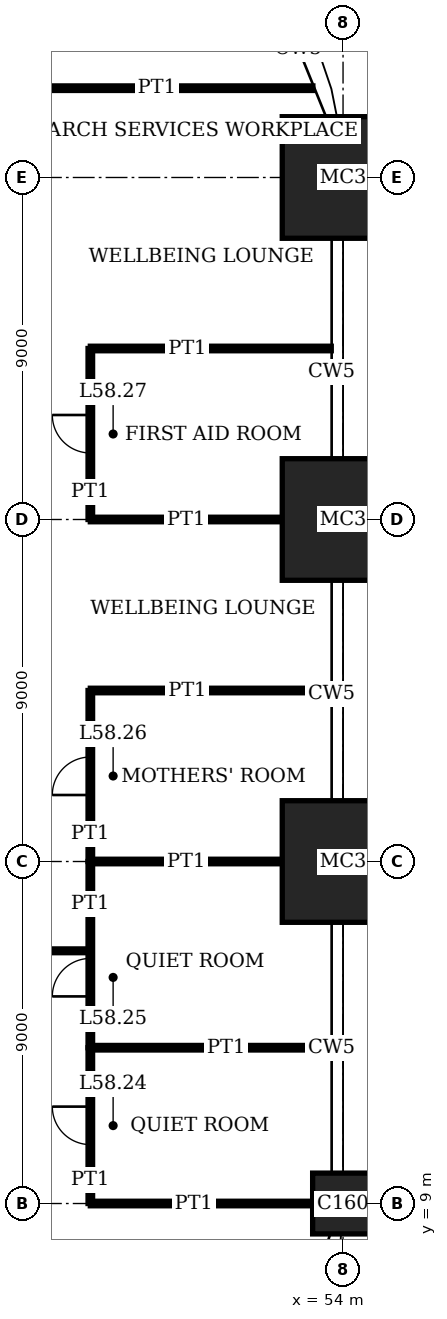
"""IFC4 building model, lengths in metres.
Left out: names, types, materials, properties, quantities, classifications, styles, units other than length and angle.
Written with IfcOpenShell. Run it as: python <this file> out.ifc"""

import sys

from ifc_helpers import new_model, si_unit, direction, frame, frame_2d, origin, origin_2d, place, context, subcontext, project, spatial, rectangle, extrude, element, fill, save


model = new_model("IFC4")
c1 = context("Model", 3, precision=1e-05, world=origin(), true_north=direction((0.0, 1.0)))
c2 = subcontext(c1, "Body", "Model", "MODEL_VIEW")
j1 = project(units=[si_unit("LENGTHUNIT", "METRE"), si_unit("PLANEANGLEUNIT", "RADIAN")], contexts=[c1])
p1 = place(None, origin())
s1 = spatial("IfcSite", under=j1, at=p1, CompositionType="ELEMENT")
p2 = place(p1, origin())
s2 = spatial("IfcBuilding", under=s1, at=p2, CompositionType="ELEMENT")
p3 = place(p2, frame((0.0, 0.0, 239.4)))
s3 = spatial("IfcBuildingStorey", under=s2, at=p3, CompositionType="ELEMENT", Elevation=239.4)
p4 = place(p3, frame((54.0, 9.0, 0.0), z_axis=(0.0, 0.0, 1.0), x_axis=(1.0, 0.0, 0.0)))
e1 = element("IfcColumn", 1, at=p4, inside=s3, PredefinedType="COLUMN", context=c2, shape_type="SweptSolid", body=[
    extrude(rectangle(XDim=1.6, YDim=1.6, at=origin_2d()), origin(), (0.0, 0.0, 1.0), 4.0),
])
for number, where, z_axis, x_axis in (
    (2, (54.0, 18.0, 0.0), (0.0, 0.0, 1.0), (1.0, 0.0, 0.0)),
    (3, (54.0, 27.0, 0.0), (0.0, 0.0, 1.0), (1.0, 0.0, 0.0)),
    (4, (54.0, 36.0, 0.0), (0.0, 0.0, 1.0), (1.0, 0.0, 0.0)),
):
    element("IfcColumn", number, at=place(p3, frame(where, z_axis=z_axis, x_axis=x_axis)), inside=s3, PredefinedType="COLUMN", context=c2, shape_type="SweptSolid", body=[
        extrude(rectangle(XDim=3.2, YDim=3.2, at=origin_2d()), origin(), (0.0, 0.0, 1.0), 4.0),
    ])
p5 = place(p3, frame((47.35, 9.0, 0.0), z_axis=(0.0, 0.0, 1.0), x_axis=(1.0, 0.0, 0.0)))
e5 = element("IfcWall", 5, at=p5, inside=s3, PredefinedType="PARTITIONING", context=c2, shape_type="SweptSolid", body=[
    extrude(rectangle(XDim=5.85, YDim=0.12, at=frame_2d((2.925, 0.0))), origin(), (0.0, 0.0, 1.0), 3.05),
])
p6 = place(p3, frame((47.35, 13.1, 0.0), z_axis=(0.0, 0.0, 1.0), x_axis=(1.0, 0.0, 0.0)))
e6 = element("IfcWall", 6, at=p6, inside=s3, PredefinedType="PARTITIONING", context=c2, shape_type="SweptSolid", body=[
    extrude(rectangle(XDim=6.34, YDim=0.12, at=frame_2d((3.17, 0.0))), origin(), (0.0, 0.0, 1.0), 3.75),
])
p7 = place(p3, frame((31.5, 15.65, 0.0), z_axis=(0.0, 0.0, 1.0), x_axis=(1.0, 0.0, 0.0)))
e7 = element("IfcWall", 7, at=p7, inside=s3, PredefinedType="PARTITIONING", context=c2, shape_type="SweptSolid", body=[
    extrude(rectangle(XDim=15.84, YDim=0.1, at=frame_2d((7.92, 0.0))), origin(), (0.0, 0.0, 1.0), 3.75),
])
p8 = place(p7, frame((7.42, 0.0, 0.0)))
e8 = element("IfcOpeningElement", 8, at=p8, cuts=e7, PredefinedType="OPENING", context=c2, shape_type="SweptSolid", body=[
    extrude(rectangle(XDim=1.0, YDim=2.4, at=frame_2d((0.5, 1.2))), frame((0.0, 0.06, 0.0), z_axis=(0.0, -1.0, 0.0), x_axis=(1.0, 0.0, 0.0)), (0.0, 0.0, 1.0), 0.12),
])
p9 = place(p3, frame((47.35, 18.0, 0.0), z_axis=(0.0, 0.0, 1.0), x_axis=(1.0, 0.0, 0.0)))
e9 = element("IfcWall", 9, at=p9, inside=s3, PredefinedType="PARTITIONING", context=c2, shape_type="SweptSolid", body=[
    extrude(rectangle(XDim=5.05, YDim=0.12, at=frame_2d((2.525, 0.0))), origin(), (0.0, 0.0, 1.0), 3.05),
])
p10 = place(p3, frame((47.35, 22.5, 0.0), z_axis=(0.0, 0.0, 1.0), x_axis=(1.0, 0.0, 0.0)))
e10 = element("IfcWall", 10, at=p10, inside=s3, PredefinedType="PARTITIONING", context=c2, shape_type="SweptSolid", body=[
    extrude(rectangle(XDim=6.34, YDim=0.12, at=frame_2d((3.17, 0.0))), origin(), (0.0, 0.0, 1.0), 3.1),
])
p11 = place(p3, frame((47.35, 27.0, 0.0), z_axis=(0.0, 0.0, 1.0), x_axis=(1.0, 0.0, 0.0)))
e11 = element("IfcWall", 11, at=p11, inside=s3, PredefinedType="PARTITIONING", context=c2, shape_type="SweptSolid", body=[
    extrude(rectangle(XDim=5.05, YDim=0.12, at=frame_2d((2.525, 0.0))), origin(), (0.0, 0.0, 1.0), 3.05),
])
p12 = place(p3, frame((47.35, 31.5, 0.0), z_axis=(0.0, 0.0, 1.0), x_axis=(1.0, 0.0, 0.0)))
e12 = element("IfcWall", 12, at=p12, inside=s3, PredefinedType="PARTITIONING", context=c2, shape_type="SweptSolid", body=[
    extrude(rectangle(XDim=6.34, YDim=0.12, at=frame_2d((3.17, 0.0))), origin(), (0.0, 0.0, 1.0), 3.1),
])
p13 = place(p3, frame((45.0, 38.35, 0.0), z_axis=(0.0, 0.0, 1.0), x_axis=(1.0, 0.0, 0.0)))
e13 = element("IfcWall", 13, at=p13, inside=s3, PredefinedType="PARTITIONING", context=c2, shape_type="SweptSolid", body=[
    extrude(rectangle(XDim=8.206, YDim=0.12, at=frame_2d((4.103, 0.0))), origin(), (0.0, 0.0, 1.0), 3.75),
])
p14 = place(p3, frame((47.35, 9.0, 0.0), z_axis=(0.0, 0.0, 1.0), x_axis=(0.0, 1.0, 0.0)))
e14 = element("IfcWall", 14, at=p14, inside=s3, PredefinedType="PARTITIONING", context=c2, shape_type="SweptSolid", body=[
    extrude(rectangle(XDim=4.1, YDim=0.12, at=frame_2d((2.05, 0.0))), origin(), (0.0, 0.0, 1.0), 3.75),
])
p15 = place(p14, frame((1.55, 0.0, 0.0)))
e15 = element("IfcOpeningElement", 15, at=p15, cuts=e14, PredefinedType="OPENING", context=c2, shape_type="SweptSolid", body=[
    extrude(rectangle(XDim=1.0, YDim=2.4, at=frame_2d((0.5, 1.2))), frame((0.0, 0.07, 0.0), z_axis=(0.0, -1.0, 0.0), x_axis=(1.0, 0.0, 0.0)), (0.0, 0.0, 1.0), 0.14),
])
p16 = place(p3, frame((47.35, 13.1, 0.0), z_axis=(0.0, 0.0, 1.0), x_axis=(0.0, 1.0, 0.0)))
e16 = element("IfcWall", 16, at=p16, inside=s3, PredefinedType="PARTITIONING", context=c2, shape_type="SweptSolid", body=[
    extrude(rectangle(XDim=4.9, YDim=0.12, at=frame_2d((2.45, 0.0))), origin(), (0.0, 0.0, 1.0), 3.75),
])
p17 = place(p16, frame((1.35, 0.0, 0.0)))
e17 = element("IfcOpeningElement", 17, at=p17, cuts=e16, PredefinedType="OPENING", context=c2, shape_type="SweptSolid", body=[
    extrude(rectangle(XDim=1.0, YDim=2.4, at=frame_2d((0.5, 1.2))), frame((0.0, 0.07, 0.0), z_axis=(0.0, -1.0, 0.0), x_axis=(1.0, 0.0, 0.0)), (0.0, 0.0, 1.0), 0.14),
])
p18 = place(p3, frame((47.35, 18.0, 0.0), z_axis=(0.0, 0.0, 1.0), x_axis=(0.0, 1.0, 0.0)))
e18 = element("IfcWall", 18, at=p18, inside=s3, PredefinedType="PARTITIONING", context=c2, shape_type="SweptSolid", body=[
    extrude(rectangle(XDim=4.5, YDim=0.12, at=frame_2d((2.25, 0.0))), origin(), (0.0, 0.0, 1.0), 3.75),
])
p19 = place(p18, frame((1.75, 0.0, 0.0)))
e19 = element("IfcOpeningElement", 19, at=p19, cuts=e18, PredefinedType="OPENING", context=c2, shape_type="SweptSolid", body=[
    extrude(rectangle(XDim=1.0, YDim=2.4, at=frame_2d((0.5, 1.2))), frame((0.0, 0.07, 0.0), z_axis=(0.0, -1.0, 0.0), x_axis=(1.0, 0.0, 0.0)), (0.0, 0.0, 1.0), 0.14),
])
p20 = place(p3, frame((47.35, 27.0, 0.0), z_axis=(0.0, 0.0, 1.0), x_axis=(0.0, 1.0, 0.0)))
e20 = element("IfcWall", 20, at=p20, inside=s3, PredefinedType="PARTITIONING", context=c2, shape_type="SweptSolid", body=[
    extrude(rectangle(XDim=4.5, YDim=0.12, at=frame_2d((2.25, 0.0))), origin(), (0.0, 0.0, 1.0), 3.75),
])
p21 = place(p20, frame((1.75, 0.0, 0.0)))
e21 = element("IfcOpeningElement", 21, at=p21, cuts=e20, PredefinedType="OPENING", context=c2, shape_type="SweptSolid", body=[
    extrude(rectangle(XDim=1.0, YDim=2.4, at=frame_2d((0.5, 1.2))), frame((0.0, 0.07, 0.0), z_axis=(0.0, -1.0, 0.0), x_axis=(1.0, 0.0, 0.0)), (0.0, 0.0, 1.0), 0.14),
])
p22 = place(p15, origin())
e22 = element("IfcDoor", 22, at=p22, inside=s3, OperationType="SINGLE_SWING_LEFT", PredefinedType="DOOR", context=c2, shape_type="SweptSolid", body=[
    extrude(rectangle(XDim=1.0, YDim=2.4, at=frame_2d((0.5, 1.2))), frame((0.0, 0.025, 0.0), z_axis=(0.0, -1.0, 0.0), x_axis=(1.0, 0.0, 0.0)), (0.0, 0.0, 1.0), 0.05),
])
fill(e15, e22)
p23 = place(p17, origin())
e23 = element("IfcDoor", 23, at=p23, inside=s3, OperationType="SINGLE_SWING_RIGHT", PredefinedType="DOOR", context=c2, shape_type="SweptSolid", body=[
    extrude(rectangle(XDim=1.0, YDim=2.4, at=frame_2d((0.5, 1.2))), frame((0.0, 0.025, 0.0), z_axis=(0.0, -1.0, 0.0), x_axis=(1.0, 0.0, 0.0)), (0.0, 0.0, 1.0), 0.05),
])
fill(e17, e23)
p24 = place(p19, origin())
e24 = element("IfcDoor", 24, at=p24, inside=s3, OperationType="SINGLE_SWING_RIGHT", PredefinedType="DOOR", context=c2, shape_type="SweptSolid", body=[
    extrude(rectangle(XDim=1.0, YDim=2.4, at=frame_2d((0.5, 1.2))), frame((0.0, 0.025, 0.0), z_axis=(0.0, -1.0, 0.0), x_axis=(1.0, 0.0, 0.0)), (0.0, 0.0, 1.0), 0.05),
])
fill(e19, e24)
p25 = place(p21, origin())
e25 = element("IfcDoor", 25, at=p25, inside=s3, OperationType="SINGLE_SWING_LEFT", PredefinedType="DOOR", context=c2, shape_type="SweptSolid", body=[
    extrude(rectangle(XDim=1.0, YDim=2.4, at=frame_2d((0.5, 1.2))), frame((0.0, 0.025, 0.0), z_axis=(0.0, -1.0, 0.0), x_axis=(1.0, 0.0, 0.0)), (0.0, 0.0, 1.0), 0.05),
])
fill(e21, e25)
save(model, sys.argv[1])
